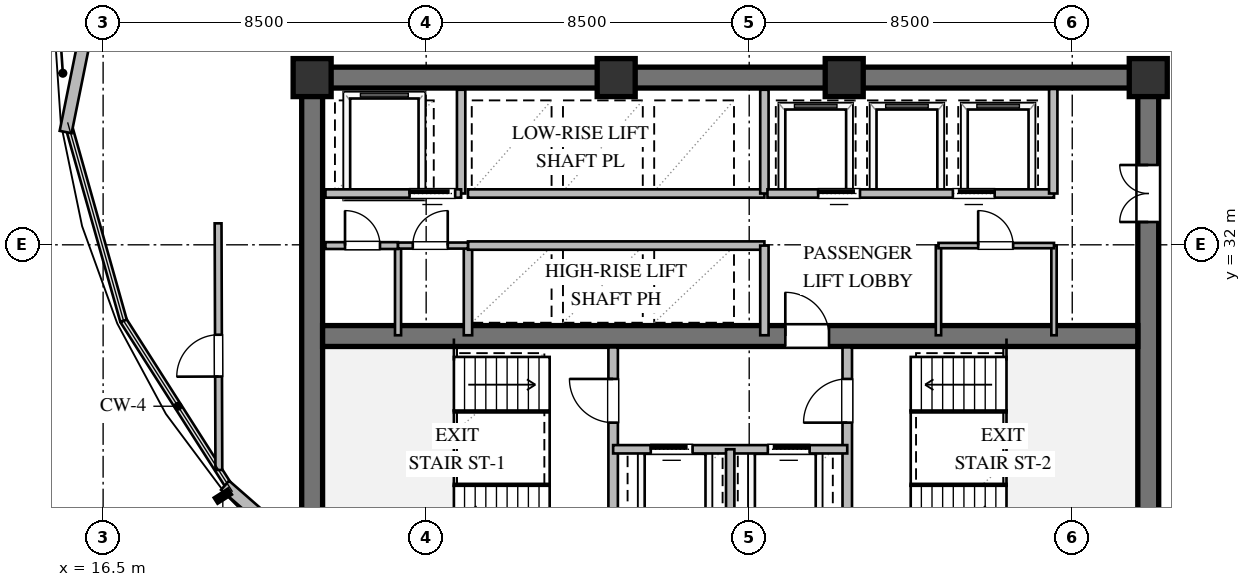
"""IFC4 building model, lengths in metres.
Left out: names, types, materials, properties, quantities, classifications, styles, units other than length and angle.
Written with IfcOpenShell. Run it as: python <this file> out.ifc"""

import sys

from ifc_helpers import new_model, si_unit, direction, frame, frame_2d, origin, origin_2d, place, context, subcontext, project, spatial, rectangle, extrude, element, fill, save


model = new_model("IFC4")
c1 = context("Model", 3, precision=1e-05, world=origin(), true_north=direction((0.0, 1.0)))
c2 = subcontext(c1, "Body", "Model", "MODEL_VIEW")
j1 = project(units=[si_unit("LENGTHUNIT", "METRE"), si_unit("PLANEANGLEUNIT", "RADIAN")], contexts=[c1])
p1 = place(None, origin())
s1 = spatial("IfcSite", under=j1, at=p1, CompositionType="ELEMENT")
p2 = place(p1, origin())
s2 = spatial("IfcBuilding", under=s1, at=p2, CompositionType="ELEMENT")
p3 = place(p2, frame((0.0, 0.0, 102.6)))
s3 = spatial("IfcBuildingStorey", under=s2, at=p3, CompositionType="ELEMENT", Elevation=102.6)
p4 = place(p3, frame((21.725, 36.4, 0.0), z_axis=(0.0, 0.0, 1.0), x_axis=(1.0, 0.0, 0.0)))
e1 = element("IfcWall", 1, at=p4, inside=s3, PredefinedType="SHEAR", context=c2, shape_type="SweptSolid", body=[
    extrude(rectangle(XDim=22.55, YDim=0.55, at=frame_2d((11.275, 0.0))), origin(), (0.0, 0.0, 1.0), 3.36),
])
p5 = place(p3, frame((22.0, 23.875, 0.0), z_axis=(0.0, 0.0, 1.0), x_axis=(0.0, 1.0, 0.0)))
e2 = element("IfcWall", 2, at=p5, inside=s3, PredefinedType="SHEAR", context=c2, shape_type="SweptSolid", body=[
    extrude(rectangle(XDim=12.25, YDim=0.55, at=frame_2d((6.125, 0.0))), origin(), (0.0, 0.0, 1.0), 3.36),
])
p6 = place(p3, frame((44.0, 23.875, 0.0), z_axis=(0.0, 0.0, 1.0), x_axis=(0.0, 1.0, 0.0)))
e3 = element("IfcWall", 3, at=p6, inside=s3, PredefinedType="SHEAR", context=c2, shape_type="SweptSolid", body=[
    extrude(rectangle(XDim=12.25, YDim=0.55, at=frame_2d((6.125, 0.0))), origin(), (0.0, 0.0, 1.0), 3.36),
])
p7 = place(p6, frame((8.725, 0.0, 0.0)))
e4 = element("IfcOpeningElement", 4, at=p7, cuts=e3, PredefinedType="OPENING", context=c2, shape_type="SweptSolid", body=[
    extrude(rectangle(XDim=1.5, YDim=2.15, at=frame_2d((0.75, 1.075))), frame((0.0, 0.285, 0.0), z_axis=(0.0, -1.0, 0.0), x_axis=(1.0, 0.0, 0.0)), (0.0, 0.0, 1.0), 0.57),
])
p8 = place(p3, frame((22.275, 29.6, 0.0), z_axis=(0.0, 0.0, 1.0), x_axis=(1.0, 0.0, 0.0)))
e5 = element("IfcWall", 5, at=p8, inside=s3, PredefinedType="SHEAR", context=c2, shape_type="SweptSolid", body=[
    extrude(rectangle(XDim=21.45, YDim=0.55, at=frame_2d((10.725, 0.0))), origin(), (0.0, 0.0, 1.0), 3.36),
])
p9 = place(p8, frame((12.175, 0.0, 0.0)))
e6 = element("IfcOpeningElement", 6, at=p9, cuts=e5, PredefinedType="OPENING", context=c2, shape_type="SweptSolid", body=[
    extrude(rectangle(XDim=1.15, YDim=2.1, at=frame_2d((0.575, 1.05))), frame((0.0, 0.285, 0.0), z_axis=(0.0, -1.0, 0.0), x_axis=(1.0, 0.0, 0.0)), (0.0, 0.0, 1.0), 0.57),
])
for number, where, z_axis, x_axis in (
    (7, (44.0, 36.4, 0.0), (0.0, 0.0, 1.0), (1.0, 0.0, 0.0)),
    (8, (36.0, 36.4, 0.0), (0.0, 0.0, 1.0), (1.0, 0.0, 0.0)),
    (9, (30.0, 36.4, 0.0), (0.0, 0.0, 1.0), (1.0, 0.0, 0.0)),
    (10, (22.0, 36.4, 0.0), (0.0, 0.0, 1.0), (1.0, 0.0, 0.0)),
):
    element("IfcColumn", number, at=place(p3, frame(where, z_axis=z_axis, x_axis=x_axis)), inside=s3, PredefinedType="COLUMN", context=c2, shape_type="SweptSolid", body=[
        extrude(rectangle(XDim=1.0, YDim=1.0, at=origin_2d()), origin(), (0.0, 0.0, 1.0), 3.6),
    ])
p10 = place(p3, frame((24.225, 21.727, 0.0), z_axis=(0.0, 0.0, 1.0), x_axis=(-0.753105964003, 0.657899237713, 0.0)))
e11 = element("IfcWall", 11, at=p10, inside=s3, PredefinedType="STANDARD", context=c2, shape_type="SweptSolid", body=[
    extrude(rectangle(XDim=5.998, YDim=0.32, at=frame_2d((2.999, 0.0))), origin(), (0.0, 0.0, 1.0), 2.35),
])
p11 = place(p3, frame((15.514, 34.967, 0.0), z_axis=(0.0, 0.0, 1.0), x_axis=(0.198370893133, 0.980127026848, 0.0)))
e12 = element("IfcWall", 12, at=p11, inside=s3, PredefinedType="STANDARD", context=c2, shape_type="SweptSolid", body=[
    extrude(rectangle(XDim=14.469, YDim=0.32, at=frame_2d((7.234, 0.0))), origin(), (0.0, 0.0, 1.0), 3.36),
])
p12 = place(p3, frame((29.92, 23.9, 0.0), z_axis=(0.0, 0.0, 1.0), x_axis=(0.0, 1.0, 0.0)))
e13 = element("IfcWall", 13, at=p12, inside=s3, PredefinedType="SOLIDWALL", context=c2, shape_type="SweptSolid", body=[
    extrude(rectangle(XDim=5.4, YDim=0.25, at=frame_2d((2.7, 0.0))), origin(), (0.0, 0.0, 1.0), 2.806),
])
p13 = place(p12, frame((3.421, 0.0, 0.0)))
e14 = element("IfcOpeningElement", 14, at=p13, cuts=e13, PredefinedType="OPENING", context=c2, shape_type="SweptSolid", body=[
    extrude(rectangle(XDim=1.15, YDim=2.1, at=frame_2d((0.575, 1.05))), frame((0.0, 0.135, 0.0), z_axis=(0.0, -1.0, 0.0), x_axis=(1.0, 0.0, 0.0)), (0.0, 0.0, 1.0), 0.27),
])
p14 = place(p3, frame((36.08, 23.9, 0.0), z_axis=(0.0, 0.0, 1.0), x_axis=(0.0, 1.0, 0.0)))
e15 = element("IfcWall", 15, at=p14, inside=s3, PredefinedType="SOLIDWALL", context=c2, shape_type="SweptSolid", body=[
    extrude(rectangle(XDim=5.4, YDim=0.25, at=frame_2d((2.7, 0.0))), origin(), (0.0, 0.0, 1.0), 3.36),
])
p15 = place(p14, frame((3.421, 0.0, 0.0)))
e16 = element("IfcOpeningElement", 16, at=p15, cuts=e15, PredefinedType="OPENING", context=c2, shape_type="SweptSolid", body=[
    extrude(rectangle(XDim=1.15, YDim=2.1, at=frame_2d((0.575, 1.05))), frame((0.0, 0.135, 0.0), z_axis=(0.0, -1.0, 0.0), x_axis=(1.0, 0.0, 0.0)), (0.0, 0.0, 1.0), 0.27),
])
p16 = place(p3, frame((29.92, 26.62, 0.0), z_axis=(0.0, 0.0, 1.0), x_axis=(1.0, 0.0, 0.0)))
e17 = element("IfcWall", 17, at=p16, inside=s3, PredefinedType="SOLIDWALL", context=c2, shape_type="SweptSolid", body=[
    extrude(rectangle(XDim=6.16, YDim=0.22, at=frame_2d((3.08, 0.0))), origin(), (0.0, 0.0, 1.0), 3.36),
])
p17 = place(p16, frame((0.99, 0.0, 0.0)))
e18 = element("IfcOpeningElement", 18, at=p17, cuts=e17, PredefinedType="OPENING", context=c2, shape_type="SweptSolid", body=[
    extrude(rectangle(XDim=1.1, YDim=2.1, at=frame_2d((0.55, 1.05))), frame((0.0, 0.12, 0.0), z_axis=(0.0, -1.0, 0.0), x_axis=(1.0, 0.0, 0.0)), (0.0, 0.0, 1.0), 0.24),
])
p18 = place(p16, frame((4.07, 0.0, 0.0)))
e19 = element("IfcOpeningElement", 19, at=p18, cuts=e17, PredefinedType="OPENING", context=c2, shape_type="SweptSolid", body=[
    extrude(rectangle(XDim=1.1, YDim=2.1, at=frame_2d((0.55, 1.05))), frame((0.0, 0.12, 0.0), z_axis=(0.0, -1.0, 0.0), x_axis=(1.0, 0.0, 0.0)), (0.0, 0.0, 1.0), 0.24),
])
p19 = place(p3, frame((33.0, 23.9, 0.0), z_axis=(0.0, 0.0, 1.0), x_axis=(0.0, 1.0, 0.0)))
e20 = element("IfcWall", 20, at=p19, inside=s3, PredefinedType="SOLIDWALL", context=c2, shape_type="SweptSolid", body=[
    extrude(rectangle(XDim=2.72, YDim=0.22, at=frame_2d((1.36, 0.0))), origin(), (0.0, 0.0, 1.0), 3.36),
])
p20 = place(p3, frame((25.92, 33.35, 0.0), z_axis=(0.0, 0.0, 1.0), x_axis=(0.0, 1.0, 0.0)))
e21 = element("IfcWall", 21, at=p20, inside=s3, PredefinedType="SOLIDWALL", context=c2, shape_type="SweptSolid", body=[
    extrude(rectangle(XDim=2.73, YDim=0.22, at=frame_2d((1.365, 0.0))), origin(), (0.0, 0.0, 1.0), 3.36),
])
p21 = place(p3, frame((22.35, 33.35, 0.0), z_axis=(0.0, 0.0, 1.0), x_axis=(1.0, 0.0, 0.0)))
e22 = element("IfcWall", 22, at=p21, inside=s3, PredefinedType="SOLIDWALL", context=c2, shape_type="SweptSolid", body=[
    extrude(rectangle(XDim=3.57, YDim=0.22, at=frame_2d((1.785, 0.0))), origin(), (0.0, 0.0, 1.0), 3.36),
])
p22 = place(p21, frame((2.213, 0.0, 0.0)))
e23 = element("IfcOpeningElement", 23, at=p22, cuts=e22, PredefinedType="OPENING", context=c2, shape_type="SweptSolid", body=[
    extrude(rectangle(XDim=1.2, YDim=2.1, at=frame_2d((0.6, 1.05))), frame((0.0, 0.12, 0.0), z_axis=(0.0, -1.0, 0.0), x_axis=(1.0, 0.0, 0.0)), (0.0, 0.0, 1.0), 0.24),
])
p23 = place(p3, frame((26.1, 29.62, 0.0), z_axis=(0.0, 0.0, 1.0), x_axis=(0.0, 1.0, 0.0)))
e24 = element("IfcWall", 24, at=p23, inside=s3, PredefinedType="SOLIDWALL", context=c2, shape_type="SweptSolid", body=[
    extrude(rectangle(XDim=2.36, YDim=0.22, at=frame_2d((1.18, 0.0))), origin(), (0.0, 0.0, 1.0), 3.36),
])
p24 = place(p3, frame((26.1, 31.98, 0.0), z_axis=(0.0, 0.0, 1.0), x_axis=(1.0, 0.0, 0.0)))
e25 = element("IfcWall", 25, at=p24, inside=s3, PredefinedType="SOLIDWALL", context=c2, shape_type="SweptSolid", body=[
    extrude(rectangle(XDim=7.8, YDim=0.22, at=frame_2d((3.9, 0.0))), origin(), (0.0, 0.0, 1.0), 3.36),
])
p25 = place(p3, frame((33.9, 29.62, 0.0), z_axis=(0.0, 0.0, 1.0), x_axis=(0.0, 1.0, 0.0)))
e26 = element("IfcWall", 26, at=p25, inside=s3, PredefinedType="SOLIDWALL", context=c2, shape_type="SweptSolid", body=[
    extrude(rectangle(XDim=2.36, YDim=0.22, at=frame_2d((1.18, 0.0))), origin(), (0.0, 0.0, 1.0), 3.36),
])
p26 = place(p3, frame((26.1, 33.35, 0.0), z_axis=(0.0, 0.0, 1.0), x_axis=(1.0, 0.0, 0.0)))
e27 = element("IfcWall", 27, at=p26, inside=s3, PredefinedType="SOLIDWALL", context=c2, shape_type="SweptSolid", body=[
    extrude(rectangle(XDim=7.8, YDim=0.22, at=frame_2d((3.9, 0.0))), origin(), (0.0, 0.0, 1.0), 3.36),
])
p27 = place(p3, frame((33.9, 33.35, 0.0), z_axis=(0.0, 0.0, 1.0), x_axis=(0.0, 1.0, 0.0)))
e28 = element("IfcWall", 28, at=p27, inside=s3, PredefinedType="SOLIDWALL", context=c2, shape_type="SweptSolid", body=[
    extrude(rectangle(XDim=2.73, YDim=0.22, at=frame_2d((1.365, 0.0))), origin(), (0.0, 0.0, 1.0), 3.36),
])
p28 = place(p3, frame((33.98, 33.35, 0.0), z_axis=(0.0, 0.0, 1.0), x_axis=(1.0, 0.0, 0.0)))
e29 = element("IfcWall", 29, at=p28, inside=s3, PredefinedType="SOLIDWALL", context=c2, shape_type="SweptSolid", body=[
    extrude(rectangle(XDim=7.54, YDim=0.22, at=frame_2d((3.77, 0.0))), origin(), (0.0, 0.0, 1.0), 3.36),
])
p29 = place(p28, frame((1.335, 0.0, 0.0)))
e30 = element("IfcOpeningElement", 30, at=p29, cuts=e29, PredefinedType="OPENING", context=c2, shape_type="SweptSolid", body=[
    extrude(rectangle(XDim=1.1, YDim=2.1, at=frame_2d((0.55, 1.05))), frame((0.0, 0.12, 0.0), z_axis=(0.0, -1.0, 0.0), x_axis=(1.0, 0.0, 0.0)), (0.0, 0.0, 1.0), 0.24),
])
p30 = place(p28, frame((4.879, 0.0, 0.0)))
e31 = element("IfcOpeningElement", 31, at=p30, cuts=e29, PredefinedType="OPENING", context=c2, shape_type="SweptSolid", body=[
    extrude(rectangle(XDim=1.1, YDim=2.1, at=frame_2d((0.55, 1.05))), frame((0.0, 0.12, 0.0), z_axis=(0.0, -1.0, 0.0), x_axis=(1.0, 0.0, 0.0)), (0.0, 0.0, 1.0), 0.24),
])
p31 = place(p3, frame((41.5, 33.35, 0.0), z_axis=(0.0, 0.0, 1.0), x_axis=(0.0, 1.0, 0.0)))
e32 = element("IfcWall", 32, at=p31, inside=s3, PredefinedType="SOLIDWALL", context=c2, shape_type="SweptSolid", body=[
    extrude(rectangle(XDim=2.75, YDim=0.22, at=frame_2d((1.375, 0.0))), origin(), (0.0, 0.0, 1.0), 3.36),
])
p32 = place(p3, frame((24.26, 29.62, 0.0), z_axis=(0.0, 0.0, 1.0), x_axis=(0.0, 1.0, 0.0)))
e33 = element("IfcWall", 33, at=p32, inside=s3, PredefinedType="PLUMBINGWALL", context=c2, shape_type="SweptSolid", body=[
    extrude(rectangle(XDim=2.36, YDim=0.16, at=frame_2d((1.18, 0.0))), origin(), (0.0, 0.0, 1.0), 3.36),
])
p33 = place(p3, frame((22.35, 31.98, 0.0), z_axis=(0.0, 0.0, 1.0), x_axis=(1.0, 0.0, 0.0)))
e34 = element("IfcWall", 34, at=p33, inside=s3, PredefinedType="PARTITIONING", context=c2, shape_type="SweptSolid", body=[
    extrude(rectangle(XDim=1.91, YDim=0.18, at=frame_2d((0.955, 0.0))), origin(), (0.0, 0.0, 1.0), 3.36),
])
p34 = place(p33, frame((0.515, 0.0, 0.0)))
e35 = element("IfcOpeningElement", 35, at=p34, cuts=e34, PredefinedType="OPENING", context=c2, shape_type="SweptSolid", body=[
    extrude(rectangle(XDim=0.92, YDim=2.1, at=frame_2d((0.46, 1.05))), frame((0.0, 0.1, 0.0), z_axis=(0.0, -1.0, 0.0), x_axis=(1.0, 0.0, 0.0)), (0.0, 0.0, 1.0), 0.2),
])
p35 = place(p3, frame((24.26, 31.98, 0.0), z_axis=(0.0, 0.0, 1.0), x_axis=(1.0, 0.0, 0.0)))
e36 = element("IfcWall", 36, at=p35, inside=s3, PredefinedType="PLUMBINGWALL", context=c2, shape_type="SweptSolid", body=[
    extrude(rectangle(XDim=1.84, YDim=0.16, at=frame_2d((0.92, 0.0))), origin(), (0.0, 0.0, 1.0), 3.36),
])
p36 = place(p35, frame((0.388, 0.0, 0.0)))
e37 = element("IfcOpeningElement", 37, at=p36, cuts=e36, PredefinedType="OPENING", context=c2, shape_type="SweptSolid", body=[
    extrude(rectangle(XDim=0.92, YDim=2.1, at=frame_2d((0.46, 1.05))), frame((0.0, 0.09, 0.0), z_axis=(0.0, -1.0, 0.0), x_axis=(1.0, 0.0, 0.0)), (0.0, 0.0, 1.0), 0.18),
])
for number, where, z_axis, x_axis in (
    (38, (38.48, 29.62, 0.0), (0.0, 0.0, 1.0), (0.0, 1.0, 0.0)),
    (39, (41.52, 29.62, 0.0), (0.0, 0.0, 1.0), (0.0, 1.0, 0.0)),
):
    element("IfcWall", number, at=place(p3, frame(where, z_axis=z_axis, x_axis=x_axis)), inside=s3, PredefinedType="PARTITIONING", context=c2, shape_type="SweptSolid", body=[
        extrude(rectangle(XDim=2.36, YDim=0.14, at=frame_2d((1.18, 0.0))), origin(), (0.0, 0.0, 1.0), 3.36),
    ])
p37 = place(p3, frame((38.48, 31.98, 0.0), z_axis=(0.0, 0.0, 1.0), x_axis=(1.0, 0.0, 0.0)))
e40 = element("IfcWall", 40, at=p37, inside=s3, PredefinedType="PARTITIONING", context=c2, shape_type="SweptSolid", body=[
    extrude(rectangle(XDim=3.04, YDim=0.14, at=frame_2d((1.52, 0.0))), origin(), (0.0, 0.0, 1.0), 3.36),
])
p38 = place(p37, frame((1.045, 0.0, 0.0)))
e41 = element("IfcOpeningElement", 41, at=p38, cuts=e40, PredefinedType="OPENING", context=c2, shape_type="SweptSolid", body=[
    extrude(rectangle(XDim=0.92, YDim=2.1, at=frame_2d((0.46, 1.05))), frame((0.0, 0.08, 0.0), z_axis=(0.0, -1.0, 0.0), x_axis=(1.0, 0.0, 0.0)), (0.0, 0.0, 1.0), 0.16),
])
p39 = place(p3, frame((19.545, 26.075, 0.0), z_axis=(0.0, 0.0, 1.0), x_axis=(-0.003159779592, 0.999995007884, 0.0)))
e42 = element("IfcWall", 42, at=p39, inside=s3, PredefinedType="PARTITIONING", context=c2, shape_type="SweptSolid", body=[
    extrude(rectangle(XDim=6.49, YDim=0.18, at=frame_2d((3.245, 0.0))), origin(), (0.0, 0.0, 1.0), 2.657),
])
p40 = place(p39, frame((2.459, 0.0, 0.0)))
e43 = element("IfcOpeningElement", 43, at=p40, cuts=e42, PredefinedType="OPENING", context=c2, shape_type="SweptSolid", body=[
    extrude(rectangle(XDim=1.1, YDim=2.1, at=frame_2d((0.55, 1.05))), frame((0.0, 0.1, 0.0), z_axis=(0.0, -1.0, 0.0), x_axis=(1.0, 0.0, 0.0)), (0.0, 0.0, 1.0), 0.2),
])
p41 = place(p13, origin())
e44 = element("IfcDoor", 44, at=p41, inside=s3, OperationType="SINGLE_SWING_RIGHT", PredefinedType="DOOR", context=c2, shape_type="SweptSolid", body=[
    extrude(rectangle(XDim=1.15, YDim=2.1, at=frame_2d((0.575, 1.05))), frame((0.0, 0.025, 0.0), z_axis=(0.0, -1.0, 0.0), x_axis=(1.0, 0.0, 0.0)), (0.0, 0.0, 1.0), 0.05),
])
fill(e14, e44)
p42 = place(p15, origin())
e45 = element("IfcDoor", 45, at=p42, inside=s3, OperationType="SINGLE_SWING_LEFT", PredefinedType="DOOR", context=c2, shape_type="SweptSolid", body=[
    extrude(rectangle(XDim=1.15, YDim=2.1, at=frame_2d((0.575, 1.05))), frame((0.0, 0.025, 0.0), z_axis=(0.0, -1.0, 0.0), x_axis=(1.0, 0.0, 0.0)), (0.0, 0.0, 1.0), 0.05),
])
fill(e16, e45)
p43 = place(p17, origin())
e46 = element("IfcDoor", 46, at=p43, inside=s3, OperationType="SLIDING_TO_LEFT", PredefinedType="DOOR", context=c2, shape_type="SweptSolid", body=[
    extrude(rectangle(XDim=1.1, YDim=2.1, at=frame_2d((0.55, 1.05))), frame((0.0, 0.025, 0.0), z_axis=(0.0, -1.0, 0.0), x_axis=(1.0, 0.0, 0.0)), (0.0, 0.0, 1.0), 0.05),
])
fill(e18, e46)
p44 = place(p18, origin())
e47 = element("IfcDoor", 47, at=p44, inside=s3, OperationType="SLIDING_TO_RIGHT", PredefinedType="DOOR", context=c2, shape_type="SweptSolid", body=[
    extrude(rectangle(XDim=1.1, YDim=2.1, at=frame_2d((0.55, 1.05))), frame((0.0, 0.025, 0.0), z_axis=(0.0, -1.0, 0.0), x_axis=(1.0, 0.0, 0.0)), (0.0, 0.0, 1.0), 0.05),
])
fill(e19, e47)
p45 = place(p9, origin())
e48 = element("IfcDoor", 48, at=p45, inside=s3, OperationType="SINGLE_SWING_LEFT", PredefinedType="DOOR", context=c2, shape_type="SweptSolid", body=[
    extrude(rectangle(XDim=1.15, YDim=2.1, at=frame_2d((0.575, 1.05))), frame((0.0, 0.025, 0.0), z_axis=(0.0, -1.0, 0.0), x_axis=(1.0, 0.0, 0.0)), (0.0, 0.0, 1.0), 0.05),
])
fill(e6, e48)
p46 = place(p7, origin())
e49 = element("IfcDoor", 49, at=p46, inside=s3, OperationType="DOUBLE_DOOR_SINGLE_SWING", PredefinedType="DOOR", context=c2, shape_type="SweptSolid", body=[
    extrude(rectangle(XDim=1.5, YDim=2.15, at=frame_2d((0.75, 1.075))), frame((0.0, 0.025, 0.0), z_axis=(0.0, -1.0, 0.0), x_axis=(1.0, 0.0, 0.0)), (0.0, 0.0, 1.0), 0.05),
])
fill(e4, e49)
p47 = place(p22, origin())
e50 = element("IfcDoor", 50, at=p47, inside=s3, OperationType="SLIDING_TO_LEFT", PredefinedType="DOOR", context=c2, shape_type="SweptSolid", body=[
    extrude(rectangle(XDim=1.2, YDim=2.1, at=frame_2d((0.6, 1.05))), frame((0.0, 0.025, 0.0), z_axis=(0.0, -1.0, 0.0), x_axis=(1.0, 0.0, 0.0)), (0.0, 0.0, 1.0), 0.05),
])
fill(e23, e50)
p48 = place(p29, origin())
e51 = element("IfcDoor", 51, at=p48, inside=s3, OperationType="SLIDING_TO_LEFT", PredefinedType="DOOR", context=c2, shape_type="SweptSolid", body=[
    extrude(rectangle(XDim=1.1, YDim=2.1, at=frame_2d((0.55, 1.05))), frame((0.0, 0.025, 0.0), z_axis=(0.0, -1.0, 0.0), x_axis=(1.0, 0.0, 0.0)), (0.0, 0.0, 1.0), 0.05),
])
fill(e30, e51)
p49 = place(p30, origin())
e52 = element("IfcDoor", 52, at=p49, inside=s3, OperationType="SLIDING_TO_RIGHT", PredefinedType="DOOR", context=c2, shape_type="SweptSolid", body=[
    extrude(rectangle(XDim=1.1, YDim=2.1, at=frame_2d((0.55, 1.05))), frame((0.0, 0.025, 0.0), z_axis=(0.0, -1.0, 0.0), x_axis=(1.0, 0.0, 0.0)), (0.0, 0.0, 1.0), 0.05),
])
fill(e31, e52)
p50 = place(p34, origin())
e53 = element("IfcDoor", 53, at=p50, inside=s3, OperationType="SINGLE_SWING_LEFT", PredefinedType="DOOR", context=c2, shape_type="SweptSolid", body=[
    extrude(rectangle(XDim=0.92, YDim=2.1, at=frame_2d((0.46, 1.05))), frame((0.0, 0.025, 0.0), z_axis=(0.0, -1.0, 0.0), x_axis=(1.0, 0.0, 0.0)), (0.0, 0.0, 1.0), 0.05),
])
fill(e35, e53)
p51 = place(p36, origin())
e54 = element("IfcDoor", 54, at=p51, inside=s3, OperationType="SINGLE_SWING_RIGHT", PredefinedType="DOOR", context=c2, shape_type="SweptSolid", body=[
    extrude(rectangle(XDim=0.92, YDim=2.1, at=frame_2d((0.46, 1.05))), frame((0.0, 0.025, 0.0), z_axis=(0.0, -1.0, 0.0), x_axis=(1.0, 0.0, 0.0)), (0.0, 0.0, 1.0), 0.05),
])
fill(e37, e54)
p52 = place(p38, origin())
e55 = element("IfcDoor", 55, at=p52, inside=s3, OperationType="SINGLE_SWING_LEFT", PredefinedType="DOOR", context=c2, shape_type="SweptSolid", body=[
    extrude(rectangle(XDim=0.92, YDim=2.1, at=frame_2d((0.46, 1.05))), frame((0.0, 0.025, 0.0), z_axis=(0.0, -1.0, 0.0), x_axis=(1.0, 0.0, 0.0)), (0.0, 0.0, 1.0), 0.05),
])
fill(e41, e55)
p53 = place(p40, origin())
e56 = element("IfcDoor", 56, at=p53, inside=s3, OperationType="SINGLE_SWING_LEFT", PredefinedType="DOOR", context=c2, shape_type="SweptSolid", body=[
    extrude(rectangle(XDim=1.1, YDim=2.1, at=frame_2d((0.55, 1.05))), frame((0.0, 0.025, 0.0), z_axis=(0.0, -1.0, 0.0), x_axis=(1.0, 0.0, 0.0)), (0.0, 0.0, 1.0), 0.05),
])
fill(e43, e56)
save(model, sys.argv[1])
